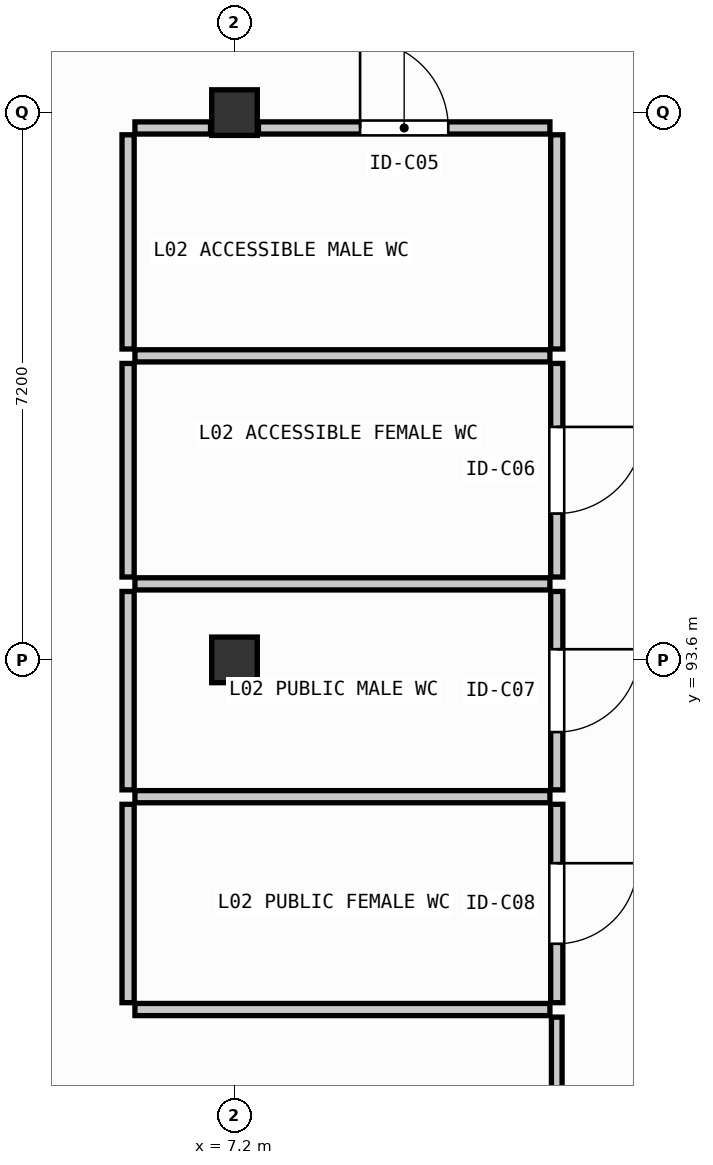
"""IFC4 building model, lengths in metres.
Left out: names, types, materials, properties, quantities, classifications, styles, units other than length and angle.
Written with IfcOpenShell. Run it as: python <this file> out.ifc"""

import sys

from ifc_helpers import new_model, si_unit, direction, frame, frame_2d, origin, origin_2d, place, context, subcontext, project, spatial, rectangle, extrude, element, fill, save


model = new_model("IFC4")
c1 = context("Model", 3, precision=1e-05, world=origin(), true_north=direction((0.0, 1.0)))
c2 = subcontext(c1, "Body", "Model", "MODEL_VIEW")
j1 = project(units=[si_unit("LENGTHUNIT", "METRE"), si_unit("PLANEANGLEUNIT", "RADIAN")], contexts=[c1])
p1 = place(None, origin())
s1 = spatial("IfcSite", under=j1, at=p1, CompositionType="ELEMENT")
p2 = place(p1, origin())
s2 = spatial("IfcBuilding", under=s1, at=p2, CompositionType="ELEMENT")
p3 = place(p2, frame((0.0, 0.0, 4.8)))
s3 = spatial("IfcBuildingStorey", under=s2, at=p3, CompositionType="ELEMENT", Elevation=4.8)
for number, where, z_axis, x_axis in (
    (1, (7.2, 93.6, 0.0), (0.0, 0.0, 1.0), (1.0, 0.0, 0.0)),
    (2, (7.2, 100.8, 0.0), (0.0, 0.0, 1.0), (1.0, 0.0, 0.0)),
):
    element("IfcColumn", number, at=place(p3, frame(where, z_axis=z_axis, x_axis=x_axis)), inside=s3, PredefinedType="COLUMN", context=c2, shape_type="SweptSolid", body=[
        extrude(rectangle(XDim=0.6, YDim=0.6, at=origin_2d()), origin(), (0.0, 0.0, 1.0), 4.2),
    ])
p4 = place(p3, frame((5.89, 100.598, 0.0), z_axis=(0.0, 0.0, 1.0), x_axis=(1.0, 0.0, 0.0)))
e3 = element("IfcWall", 3, at=p4, inside=s3, PredefinedType="PLUMBINGWALL", context=c2, shape_type="SweptSolid", body=[
    extrude(rectangle(XDim=0.995, YDim=0.16, at=frame_2d((0.498, 0.0))), origin(), (0.0, 0.0, 1.0), 3.4),
])
p5 = place(p3, frame((7.515, 100.598, 0.0), z_axis=(0.0, 0.0, 1.0), x_axis=(1.0, 0.0, 0.0)))
e4 = element("IfcWall", 4, at=p5, inside=s3, PredefinedType="PLUMBINGWALL", context=c2, shape_type="SweptSolid", body=[
    extrude(rectangle(XDim=3.835, YDim=0.16, at=frame_2d((1.917, 0.0))), origin(), (0.0, 0.0, 1.0), 3.4),
])
p6 = place(p5, frame((1.337, 0.0, 0.0)))
e5 = element("IfcOpeningElement", 5, at=p6, cuts=e4, PredefinedType="OPENING", context=c2, shape_type="SweptSolid", body=[
    extrude(rectangle(XDim=1.16, YDim=2.26, at=frame_2d((0.58, 1.13))), frame((0.0, 0.09, 0.0), z_axis=(0.0, -1.0, 0.0), x_axis=(1.0, 0.0, 0.0)), (0.0, 0.0, 1.0), 0.18),
])
p7 = place(p3, frame((11.44, 100.508, 0.0), z_axis=(0.0, 0.0, 1.0), x_axis=(0.0, -1.0, 0.0)))
e6 = element("IfcWall", 6, at=p7, inside=s3, PredefinedType="PLUMBINGWALL", context=c2, shape_type="SweptSolid", body=[
    extrude(rectangle(XDim=2.818, YDim=0.16, at=frame_2d((1.409, 0.0))), origin(), (0.0, 0.0, 1.0), 3.4),
])
p8 = place(p3, frame((11.35, 97.6, 0.0), z_axis=(0.0, 0.0, 1.0), x_axis=(-1.0, 0.0, 0.0)))
e7 = element("IfcWall", 7, at=p8, inside=s3, PredefinedType="PLUMBINGWALL", context=c2, shape_type="SweptSolid", body=[
    extrude(rectangle(XDim=5.46, YDim=0.16, at=frame_2d((2.73, 0.0))), origin(), (0.0, 0.0, 1.0), 3.5),
])
p9 = place(p3, frame((5.8, 97.69, 0.0), z_axis=(0.0, 0.0, 1.0), x_axis=(0.0, 1.0, 0.0)))
e8 = element("IfcWall", 8, at=p9, inside=s3, PredefinedType="PLUMBINGWALL", context=c2, shape_type="SweptSolid", body=[
    extrude(rectangle(XDim=2.818, YDim=0.16, at=frame_2d((1.409, 0.0))), origin(), (0.0, 0.0, 1.0), 3.4),
])
p10 = place(p3, frame((11.44, 97.5, 0.0), z_axis=(0.0, 0.0, 1.0), x_axis=(0.0, -1.0, 0.0)))
e9 = element("IfcWall", 9, at=p10, inside=s3, PredefinedType="PLUMBINGWALL", context=c2, shape_type="SweptSolid", body=[
    extrude(rectangle(XDim=2.81, YDim=0.16, at=frame_2d((1.405, 0.0))), origin(), (0.0, 0.0, 1.0), 4.2),
])
p11 = place(p10, frame((0.835, 0.0, 0.0)))
e10 = element("IfcOpeningElement", 10, at=p11, cuts=e9, PredefinedType="OPENING", context=c2, shape_type="SweptSolid", body=[
    extrude(rectangle(XDim=1.14, YDim=2.12, at=frame_2d((0.57, 1.06))), frame((0.0, 0.09, 0.0), z_axis=(0.0, -1.0, 0.0), x_axis=(1.0, 0.0, 0.0)), (0.0, 0.0, 1.0), 0.18),
])
p12 = place(p3, frame((11.35, 94.6, 0.0), z_axis=(0.0, 0.0, 1.0), x_axis=(-1.0, 0.0, 0.0)))
e11 = element("IfcWall", 11, at=p12, inside=s3, PredefinedType="PLUMBINGWALL", context=c2, shape_type="SweptSolid", body=[
    extrude(rectangle(XDim=5.46, YDim=0.16, at=frame_2d((2.73, 0.0))), origin(), (0.0, 0.0, 1.0), 3.5),
])
p13 = place(p3, frame((5.8, 94.69, 0.0), z_axis=(0.0, 0.0, 1.0), x_axis=(0.0, 1.0, 0.0)))
e12 = element("IfcWall", 12, at=p13, inside=s3, PredefinedType="PLUMBINGWALL", context=c2, shape_type="SweptSolid", body=[
    extrude(rectangle(XDim=2.81, YDim=0.16, at=frame_2d((1.405, 0.0))), origin(), (0.0, 0.0, 1.0), 4.2),
])
p14 = place(p3, frame((11.44, 94.5, 0.0), z_axis=(0.0, 0.0, 1.0), x_axis=(0.0, -1.0, 0.0)))
e13 = element("IfcWall", 13, at=p14, inside=s3, PredefinedType="PLUMBINGWALL", context=c2, shape_type="SweptSolid", body=[
    extrude(rectangle(XDim=2.61, YDim=0.16, at=frame_2d((1.305, 0.0))), origin(), (0.0, 0.0, 1.0), 3.4),
])
p15 = place(p14, frame((0.76, 0.0, 0.0)))
e14 = element("IfcOpeningElement", 14, at=p15, cuts=e13, PredefinedType="OPENING", context=c2, shape_type="SweptSolid", body=[
    extrude(rectangle(XDim=1.09, YDim=2.22, at=frame_2d((0.545, 1.11))), frame((0.0, 0.09, 0.0), z_axis=(0.0, -1.0, 0.0), x_axis=(1.0, 0.0, 0.0)), (0.0, 0.0, 1.0), 0.18),
])
p16 = place(p3, frame((11.35, 91.8, 0.0), z_axis=(0.0, 0.0, 1.0), x_axis=(-1.0, 0.0, 0.0)))
e15 = element("IfcWall", 15, at=p16, inside=s3, PredefinedType="PLUMBINGWALL", context=c2, shape_type="SweptSolid", body=[
    extrude(rectangle(XDim=5.46, YDim=0.16, at=frame_2d((2.73, 0.0))), origin(), (0.0, 0.0, 1.0), 3.5),
])
p17 = place(p3, frame((5.8, 91.89, 0.0), z_axis=(0.0, 0.0, 1.0), x_axis=(0.0, 1.0, 0.0)))
e16 = element("IfcWall", 16, at=p17, inside=s3, PredefinedType="PLUMBINGWALL", context=c2, shape_type="SweptSolid", body=[
    extrude(rectangle(XDim=2.61, YDim=0.16, at=frame_2d((1.305, 0.0))), origin(), (0.0, 0.0, 1.0), 3.4),
])
p18 = place(p3, frame((11.44, 91.7, 0.0), z_axis=(0.0, 0.0, 1.0), x_axis=(0.0, -1.0, 0.0)))
e17 = element("IfcWall", 17, at=p18, inside=s3, PredefinedType="PLUMBINGWALL", context=c2, shape_type="SweptSolid", body=[
    extrude(rectangle(XDim=2.61, YDim=0.16, at=frame_2d((1.305, 0.0))), origin(), (0.0, 0.0, 1.0), 4.2),
])
p19 = place(p18, frame((0.775, 0.0, 0.0)))
e18 = element("IfcOpeningElement", 18, at=p19, cuts=e17, PredefinedType="OPENING", context=c2, shape_type="SweptSolid", body=[
    extrude(rectangle(XDim=1.06, YDim=2.14, at=frame_2d((0.53, 1.07))), frame((0.0, 0.09, 0.0), z_axis=(0.0, -1.0, 0.0), x_axis=(1.0, 0.0, 0.0)), (0.0, 0.0, 1.0), 0.18),
])
p20 = place(p3, frame((11.35, 89.0, 0.0), z_axis=(0.0, 0.0, 1.0), x_axis=(-1.0, 0.0, 0.0)))
e19 = element("IfcWall", 19, at=p20, inside=s3, PredefinedType="PLUMBINGWALL", context=c2, shape_type="SweptSolid", body=[
    extrude(rectangle(XDim=5.46, YDim=0.16, at=frame_2d((2.73, 0.0))), origin(), (0.0, 0.0, 1.0), 3.5),
])
p21 = place(p3, frame((5.8, 89.09, 0.0), z_axis=(0.0, 0.0, 1.0), x_axis=(0.0, 1.0, 0.0)))
e20 = element("IfcWall", 20, at=p21, inside=s3, PredefinedType="PLUMBINGWALL", context=c2, shape_type="SweptSolid", body=[
    extrude(rectangle(XDim=2.61, YDim=0.16, at=frame_2d((1.305, 0.0))), origin(), (0.0, 0.0, 1.0), 4.2),
])
p22 = place(p3, frame((11.44, 88.9, 0.0), z_axis=(0.0, 0.0, 1.0), x_axis=(0.0, -1.0, 0.0)))
e21 = element("IfcWall", 21, at=p22, inside=s3, PredefinedType="PARTITIONING", context=c2, shape_type="SweptSolid", body=[
    extrude(rectangle(XDim=16.64, YDim=0.14, at=frame_2d((8.32, 0.0))), origin(), (0.0, 0.0, 1.0), 3.4),
])
p23 = place(p22, frame((7.8, 0.0, 0.0)))
e22 = element("IfcOpeningElement", 22, at=p23, cuts=e21, PredefinedType="OPENING", context=c2, shape_type="SweptSolid", body=[
    extrude(rectangle(XDim=1.04, YDim=2.12, at=frame_2d((0.52, 1.06))), frame((0.0, 0.08, 0.0), z_axis=(0.0, -1.0, 0.0), x_axis=(1.0, 0.0, 0.0)), (0.0, 0.0, 1.0), 0.16),
])
p24 = place(p6, origin())
e23 = element("IfcDoor", 23, at=p24, inside=s3, OperationType="SINGLE_SWING_LEFT", PredefinedType="DOOR", context=c2, shape_type="SweptSolid", body=[
    extrude(rectangle(XDim=1.16, YDim=2.26, at=frame_2d((0.58, 1.13))), frame((0.0, 0.025, 0.0), z_axis=(0.0, -1.0, 0.0), x_axis=(1.0, 0.0, 0.0)), (0.0, 0.0, 1.0), 0.05),
])
fill(e5, e23)
p25 = place(p11, origin())
e24 = element("IfcDoor", 24, at=p25, inside=s3, OperationType="SINGLE_SWING_RIGHT", PredefinedType="DOOR", context=c2, shape_type="SweptSolid", body=[
    extrude(rectangle(XDim=1.14, YDim=2.12, at=frame_2d((0.57, 1.06))), frame((0.0, 0.025, 0.0), z_axis=(0.0, -1.0, 0.0), x_axis=(1.0, 0.0, 0.0)), (0.0, 0.0, 1.0), 0.05),
])
fill(e10, e24)
p26 = place(p15, origin())
e25 = element("IfcDoor", 25, at=p26, inside=s3, OperationType="SINGLE_SWING_LEFT", PredefinedType="DOOR", context=c2, shape_type="SweptSolid", body=[
    extrude(rectangle(XDim=1.09, YDim=2.22, at=frame_2d((0.545, 1.11))), frame((0.0, 0.025, 0.0), z_axis=(0.0, -1.0, 0.0), x_axis=(1.0, 0.0, 0.0)), (0.0, 0.0, 1.0), 0.05),
])
fill(e14, e25)
p27 = place(p19, origin())
e26 = element("IfcDoor", 26, at=p27, inside=s3, OperationType="SINGLE_SWING_RIGHT", PredefinedType="DOOR", context=c2, shape_type="SweptSolid", body=[
    extrude(rectangle(XDim=1.06, YDim=2.14, at=frame_2d((0.53, 1.07))), frame((0.0, 0.025, 0.0), z_axis=(0.0, -1.0, 0.0), x_axis=(1.0, 0.0, 0.0)), (0.0, 0.0, 1.0), 0.05),
])
fill(e18, e26)
save(model, sys.argv[1])
